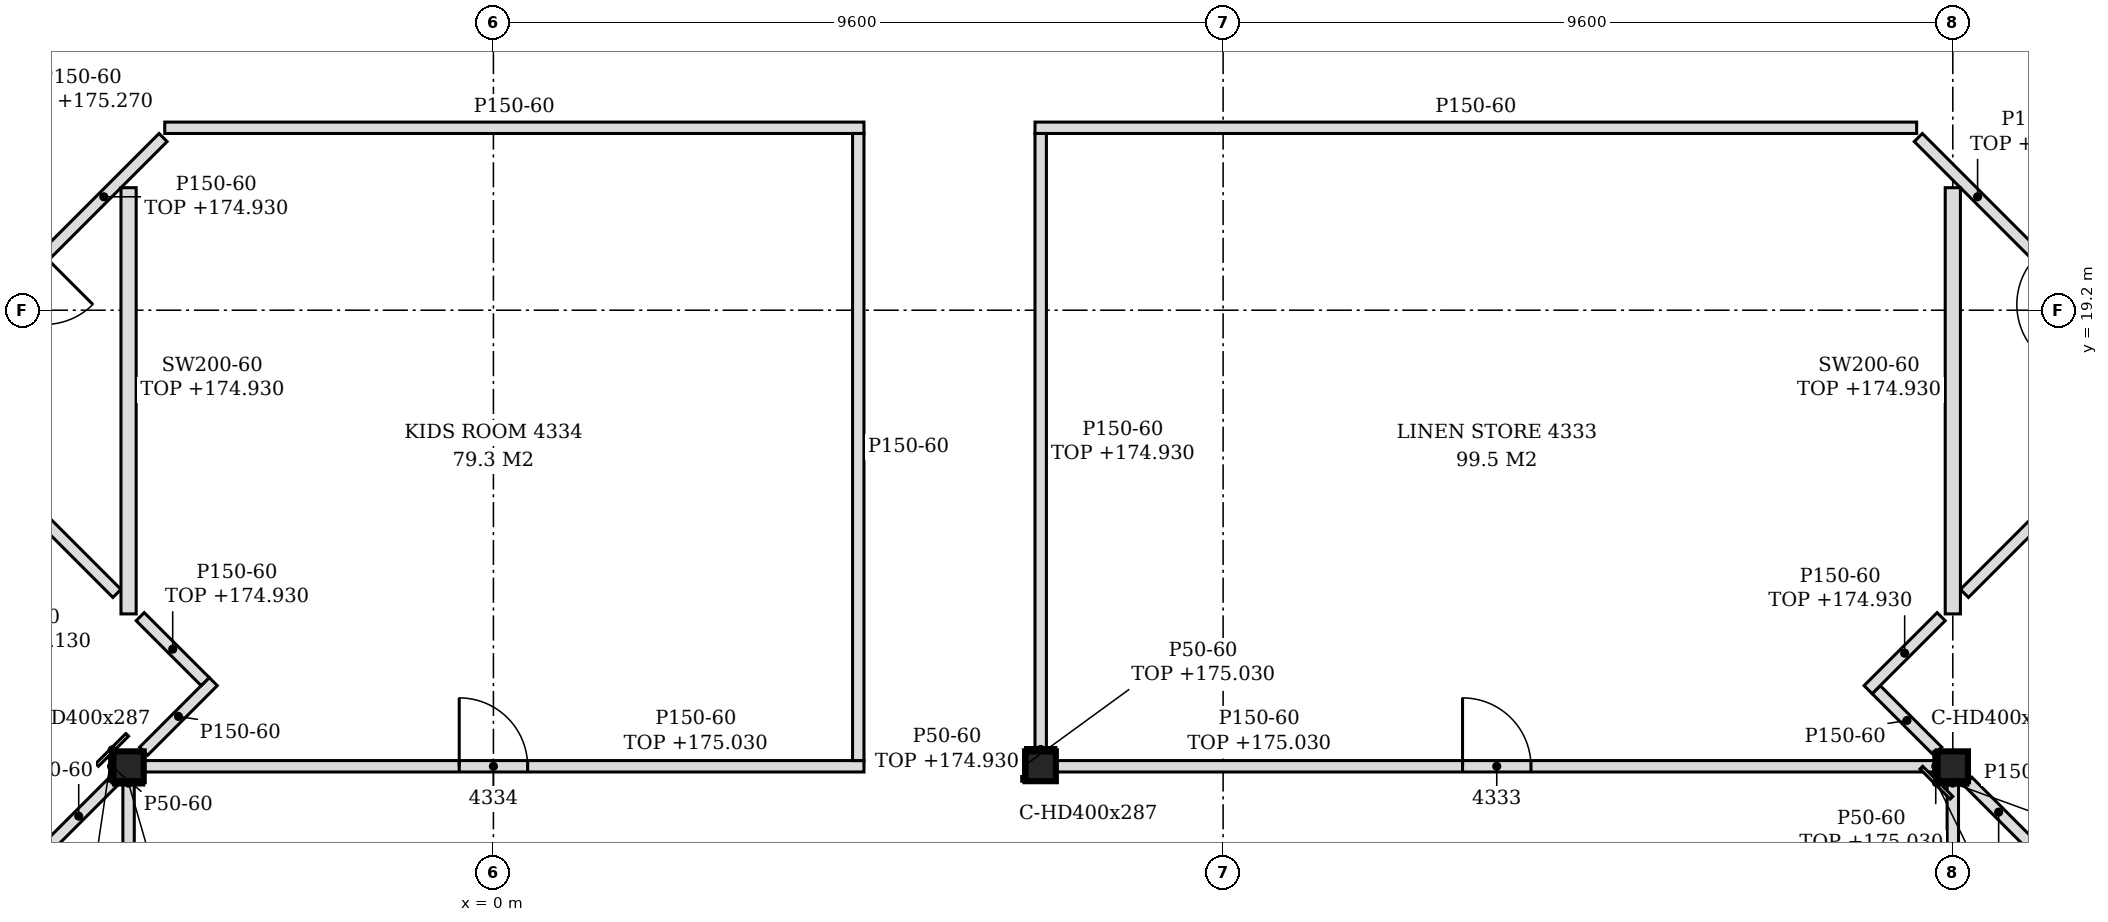
"""IFC4 building model, lengths in metres.
Left out: names, types, materials, properties, quantities, classifications, styles, units other than length and angle.
Written with IfcOpenShell. Run it as: python <this file> out.ifc"""

import sys

from ifc_helpers import new_model, si_unit, direction, frame, frame_2d, origin, origin_2d, place, context, subcontext, project, spatial, polyline, rectangle, i_section, outline, extrude, element, fill, save


model = new_model("IFC4")
c1 = context("Model", 3, precision=1e-05, world=origin(), true_north=direction((0.0, 1.0)))
c2 = subcontext(c1, "Body", "Model", "MODEL_VIEW")
j1 = project(units=[si_unit("LENGTHUNIT", "METRE"), si_unit("PLANEANGLEUNIT", "RADIAN")], contexts=[c1])
p1 = place(None, origin())
s1 = spatial("IfcSite", under=j1, at=p1, CompositionType="ELEMENT")
p2 = place(p1, origin())
s2 = spatial("IfcBuilding", under=s1, at=p2, CompositionType="ELEMENT")
p3 = place(p2, frame((0.0, 0.0, 172.2)))
s3 = spatial("IfcBuildingStorey", under=s2, at=p3, CompositionType="ELEMENT", Elevation=172.2)
for number, where, z_axis, x_axis in (
    (1, (-4.8, 13.2, -0.15), (0.0, 0.0, 1.0), (1.0, 0.0, 0.0)),
    (2, (7.2, 13.2, -0.15), (0.0, 0.0, 1.0), (1.0, 0.0, 0.0)),
    (3, (19.2, 13.2, -0.15), (0.0, 0.0, 1.0), (1.0, 0.0, 0.0)),
):
    element("IfcColumn", number, at=place(p3, frame(where, z_axis=z_axis, x_axis=x_axis)), inside=s3, PredefinedType="COLUMN", context=c2, shape_type="SweptSolid", body=[
        extrude(i_section(OverallWidth=0.399, OverallDepth=0.393, WebThickness=0.023, FlangeThickness=0.037, FilletRadius=0.015, at=origin_2d()), origin(), (0.0, 0.0, 1.0), 3.6),
    ])
p4 = place(p3, frame((-4.8, 2.596, 0.0), z_axis=(0.0, 0.0, 1.0), x_axis=(0.0, 1.0, 0.0)))
e4 = element("IfcWall", 4, at=p4, inside=s3, PredefinedType="PARTITIONING", context=c2, shape_type="SweptSolid", body=[
    extrude(rectangle(XDim=10.407, YDim=0.15, at=frame_2d((5.204, 0.0))), origin(), (0.0, 0.0, 1.0), 2.83),
])
p5 = place(p4, frame((4.303, 0.0, 0.0)))
e5 = element("IfcOpeningElement", 5, at=p5, cuts=e4, PredefinedType="OPENING", context=c2, shape_type="SweptSolid", body=[
    extrude(rectangle(XDim=0.9, YDim=2.1, at=frame_2d((0.45, 1.05))), frame((0.0, 0.085, 0.0), z_axis=(0.0, -1.0, 0.0), x_axis=(1.0, 0.0, 0.0)), (0.0, 0.0, 1.0), 0.17),
])
p6 = place(p3, frame((19.2, 2.596, 0.0), z_axis=(0.0, 0.0, 1.0), x_axis=(0.0, 1.0, 0.0)))
e6 = element("IfcWall", 6, at=p6, inside=s3, PredefinedType="PARTITIONING", context=c2, shape_type="SweptSolid", body=[
    extrude(rectangle(XDim=10.407, YDim=0.15, at=frame_2d((5.204, 0.0))), origin(), (0.0, 0.0, 1.0), 2.83),
])
p7 = place(p6, frame((2.954, 0.0, 0.0)))
e7 = element("IfcOpeningElement", 7, at=p7, cuts=e6, PredefinedType="OPENING", context=c2, shape_type="SweptSolid", body=[
    extrude(rectangle(XDim=0.9, YDim=2.1, at=frame_2d((0.45, 1.05))), frame((0.0, 0.085, 0.0), z_axis=(0.0, -1.0, 0.0), x_axis=(1.0, 0.0, 0.0)), (0.0, 0.0, 1.0), 0.17),
])
p8 = place(p3, frame((-5.914, 12.086, 0.0), z_axis=(0.0, 0.0, 1.0), x_axis=(0.707106781187, 0.707106781187, 0.0)))
e8 = element("IfcWall", 8, at=p8, inside=s3, PredefinedType="PARTITIONING", context=c2, shape_type="SweptSolid", body=[
    extrude(rectangle(XDim=1.295, YDim=0.15, at=frame_2d((0.648, 0.0))), origin(), (0.0, 0.0, 1.0), 3.45),
])
p9 = place(p3, frame((20.208, 12.086, 0.0), z_axis=(0.0, 0.0, 1.0), x_axis=(0.706747296365, 0.707466083343, 0.0)))
e9 = element("IfcWall", 9, at=p9, inside=s3, PredefinedType="PARTITIONING", context=c2, shape_type="SweptSolid", body=[
    extrude(rectangle(XDim=1.359, YDim=0.15, at=frame_2d((0.679, 0.0))), origin(), (0.0, 0.0, 1.0), 3.45),
])
p10 = place(p3, frame((20.208, 12.192, 0.0), z_axis=(0.0, 0.0, 1.0), x_axis=(-0.70721334539, 0.707000200921, 0.0)))
e10 = element("IfcWall", 10, at=p10, inside=s3, PredefinedType="PARTITIONING", context=c2, shape_type="SweptSolid", body=[
    extrude(rectangle(XDim=1.146, YDim=0.15, at=frame_2d((0.573, 0.0))), origin(), (0.0, 0.0, 1.0), 3.45),
])
p11 = place(p3, frame((-4.601, 13.2, 0.0), z_axis=(0.0, 0.0, 1.0), x_axis=(1.0, 0.0, 0.0)))
e11 = element("IfcWall", 11, at=p11, inside=s3, PredefinedType="PARTITIONING", context=c2, shape_type="SweptSolid", body=[
    extrude(rectangle(XDim=9.476, YDim=0.15, at=frame_2d((4.738, 0.0))), origin(), (0.0, 0.0, 1.0), 2.83),
])
p12 = place(p11, frame((4.151, 0.0, 0.0)))
e12 = element("IfcOpeningElement", 12, at=p12, cuts=e11, PredefinedType="OPENING", context=c2, shape_type="SweptSolid", body=[
    extrude(rectangle(XDim=0.9, YDim=2.1, at=frame_2d((0.45, 1.05))), frame((0.0, 0.085, 0.0), z_axis=(0.0, -1.0, 0.0), x_axis=(1.0, 0.0, 0.0)), (0.0, 0.0, 1.0), 0.17),
])
p13 = place(p3, frame((7.399, 13.2, 0.0), z_axis=(0.0, 0.0, 1.0), x_axis=(1.0, 0.0, 0.0)))
e13 = element("IfcWall", 13, at=p13, inside=s3, PredefinedType="PARTITIONING", context=c2, shape_type="SweptSolid", body=[
    extrude(rectangle(XDim=11.601, YDim=0.15, at=frame_2d((5.801, 0.0))), origin(), (0.0, 0.0, 1.0), 2.83),
])
p14 = place(p13, frame((5.351, 0.0, 0.0)))
e14 = element("IfcOpeningElement", 14, at=p14, cuts=e13, PredefinedType="OPENING", context=c2, shape_type="SweptSolid", body=[
    extrude(rectangle(XDim=0.9, YDim=2.1, at=frame_2d((0.45, 1.05))), frame((0.0, 0.085, 0.0), z_axis=(0.0, -1.0, 0.0), x_axis=(1.0, 0.0, 0.0)), (0.0, 0.0, 1.0), 0.17),
])
p15 = place(p3, frame((4.8, 13.275, 0.0), z_axis=(0.0, 0.0, 1.0), x_axis=(0.0, 1.0, 0.0)))
e15 = element("IfcWall", 15, at=p15, inside=s3, PredefinedType="PARTITIONING", context=c2, shape_type="SweptSolid", body=[
    extrude(outline(polyline([(0.0, 0.0), (8.25, 0.0), (8.25, 3.45), (5.88, 3.45), (5.878, 2.88), (5.67, 2.88), (5.668, 3.45), (0.075, 3.45), (0.073, 2.83), (0.0, 2.83), (0.0, 0.0)])), frame((0.0, 0.075, 0.0), z_axis=(0.0, -1.0, 0.0), x_axis=(1.0, 0.0, 0.0)), (0.0, 0.0, 1.0), 0.15),
])
p16 = place(p3, frame((-4.602, 13.398, 0.0), z_axis=(0.0, 0.0, 1.0), x_axis=(0.707106781187, 0.707106781187, 0.0)))
e16 = element("IfcWall", 16, at=p16, inside=s3, PredefinedType="PARTITIONING", context=c2, shape_type="SweptSolid", body=[
    extrude(rectangle(XDim=1.296, YDim=0.15, at=frame_2d((0.648, 0.0))), origin(), (0.0, 0.0, 1.0), 3.45),
])
p17 = place(p3, frame((7.2, 13.396, 0.0), z_axis=(0.0, 0.0, 1.0), x_axis=(0.0, 1.0, 0.0)))
e17 = element("IfcWall", 17, at=p17, inside=s3, PredefinedType="PARTITIONING", context=c2, shape_type="SweptSolid", body=[
    extrude(rectangle(XDim=8.128, YDim=0.15, at=frame_2d((4.064, 0.0))), origin(), (0.0, 0.0, 1.0), 2.73),
])
p18 = place(p3, frame((19.002, 13.398, 0.0), z_axis=(0.0, 0.0, 1.0), x_axis=(-0.707000200921, 0.70721334539, 0.0)))
e18 = element("IfcWall", 18, at=p18, inside=s3, PredefinedType="PARTITIONING", context=c2, shape_type="SweptSolid", body=[
    extrude(rectangle(XDim=1.146, YDim=0.15, at=frame_2d((0.573, 0.0))), origin(), (0.0, 0.0, 1.0), 3.45),
])
p19 = place(p3, frame((18.086, 14.208, 0.0), z_axis=(0.0, 0.0, 1.0), x_axis=(0.707466083343, 0.706747296365, 0.0)))
e19 = element("IfcWall", 19, at=p19, inside=s3, PredefinedType="PARTITIONING", context=c2, shape_type="SweptSolid", body=[
    extrude(rectangle(XDim=1.359, YDim=0.15, at=frame_2d((0.679, 0.0))), origin(), (0.0, 0.0, 1.0), 2.73),
])
p20 = place(p3, frame((-3.792, 14.314, 0.0), z_axis=(0.0, 0.0, 1.0), x_axis=(-0.707409718716, 0.706803713817, 0.0)))
e20 = element("IfcWall", 20, at=p20, inside=s3, PredefinedType="PARTITIONING", context=c2, shape_type="SweptSolid", body=[
    extrude(rectangle(XDim=1.208, YDim=0.15, at=frame_2d((0.604, 0.0))), origin(), (0.0, 0.0, 1.0), 2.73),
])
for number, where, z_axis, x_axis in (
    (21, (-4.8, 15.205, 0.0), (0.0, 0.0, 1.0), (0.0, 1.0, 0.0)),
    (22, (19.2, 15.205, 0.0), (0.0, 0.0, 1.0), (0.0, 1.0, 0.0)),
):
    element("IfcWall", number, at=place(p3, frame(where, z_axis=z_axis, x_axis=x_axis)), inside=s3, PredefinedType="PARTITIONING", context=c2, shape_type="SweptSolid", body=[
        extrude(rectangle(XDim=5.607, YDim=0.2, at=frame_2d((2.804, 0.0))), origin(), (0.0, 0.0, 1.0), 2.73),
    ])
p21 = place(p3, frame((-4.953, 15.474, 0.0), z_axis=(0.0, 0.0, 1.0), x_axis=(-0.707008778354, 0.707204770438, 0.0)))
e23 = element("IfcWall", 23, at=p21, inside=s3, PredefinedType="PARTITIONING", context=c2, shape_type="SweptSolid", body=[
    extrude(rectangle(XDim=3.737, YDim=0.15, at=frame_2d((1.869, 0.0))), origin(), (0.0, 0.0, 1.0), 2.73),
])
p22 = place(p3, frame((19.353, 15.474, 0.0), z_axis=(0.0, 0.0, 1.0), x_axis=(0.707012556818, 0.707200993001, 0.0)))
e24 = element("IfcWall", 24, at=p22, inside=s3, PredefinedType="PARTITIONING", context=c2, shape_type="SweptSolid", body=[
    extrude(rectangle(XDim=3.887, YDim=0.15, at=frame_2d((1.943, 0.0))), origin(), (0.0, 0.0, 1.0), 2.73),
])
p23 = place(p3, frame((-7.701, 18.117, 0.0), z_axis=(0.0, 0.0, 1.0), x_axis=(0.707106781187, 0.707106781187, 0.0)))
e25 = element("IfcWall", 25, at=p23, inside=s3, PredefinedType="PARTITIONING", context=c2, shape_type="SweptSolid", body=[
    extrude(rectangle(XDim=4.745, YDim=0.15, at=frame_2d((2.372, 0.0))), origin(), (0.0, 0.0, 1.0), 2.73),
])
p24 = place(p23, frame((1.639, 0.0, 0.0)))
e26 = element("IfcOpeningElement", 26, at=p24, cuts=e25, PredefinedType="OPENING", context=c2, shape_type="SweptSolid", body=[
    extrude(rectangle(XDim=0.9, YDim=2.1, at=frame_2d((0.45, 1.05))), frame((0.0, 0.085, 0.0), z_axis=(0.0, -1.0, 0.0), x_axis=(1.0, 0.0, 0.0)), (0.0, 0.0, 1.0), 0.17),
])
p25 = place(p3, frame((21.995, 18.223, 0.0), z_axis=(0.0, 0.0, 1.0), x_axis=(-0.707106781187, 0.707106781187, 0.0)))
e27 = element("IfcWall", 27, at=p25, inside=s3, PredefinedType="PARTITIONING", context=c2, shape_type="SweptSolid", body=[
    extrude(rectangle(XDim=4.595, YDim=0.15, at=frame_2d((2.297, 0.0))), origin(), (0.0, 0.0, 1.0), 2.73),
])
p26 = place(p25, frame((1.489, 0.0, 0.0)))
e28 = element("IfcOpeningElement", 28, at=p26, cuts=e27, PredefinedType="OPENING", context=c2, shape_type="SweptSolid", body=[
    extrude(rectangle(XDim=0.9, YDim=2.1, at=frame_2d((0.45, 1.05))), frame((0.0, 0.085, 0.0), z_axis=(0.0, -1.0, 0.0), x_axis=(1.0, 0.0, 0.0)), (0.0, 0.0, 1.0), 0.17),
])
p27 = place(p3, frame((23.117, 20.495, 0.0), z_axis=(0.0, 0.0, 1.0), x_axis=(-0.707081222956, 0.707132338493, 0.0)))
e29 = element("IfcWall", 29, at=p27, inside=s3, PredefinedType="PARTITIONING", context=c2, shape_type="SweptSolid", body=[
    extrude(rectangle(XDim=4.776, YDim=0.15, at=frame_2d((2.388, 0.0))), origin(), (0.0, 0.0, 1.0), 2.98),
])
p28 = place(p3, frame((-8.604, 20.608, 0.0), z_axis=(0.0, 0.0, 1.0), x_axis=(0.707080337897, 0.707133223487, 0.0)))
e30 = element("IfcWall", 30, at=p28, inside=s3, PredefinedType="PARTITIONING", context=c2, shape_type="SweptSolid", body=[
    extrude(rectangle(XDim=4.616, YDim=0.15, at=frame_2d((2.308, 0.0))), origin(), (0.0, 0.0, 1.0), 3.07),
])
p29 = place(p28, frame((1.085, 0.0, 0.0)))
e31 = element("IfcOpeningElement", 31, at=p29, cuts=e30, PredefinedType="OPENING", context=c2, shape_type="SweptSolid", body=[
    extrude(rectangle(XDim=0.9, YDim=2.1, at=frame_2d((0.45, 1.05))), frame((0.0, 0.085, 0.0), z_axis=(0.0, -1.0, 0.0), x_axis=(1.0, 0.0, 0.0)), (0.0, 0.0, 1.0), 0.17),
])
p30 = place(p3, frame((-4.324, 21.6, 0.0), z_axis=(0.0, 0.0, 1.0), x_axis=(1.0, 0.0, 0.0)))
e32 = element("IfcWall", 32, at=p30, inside=s3, PredefinedType="PARTITIONING", context=c2, shape_type="SweptSolid", body=[
    extrude(rectangle(XDim=9.199, YDim=0.15, at=frame_2d((4.6, 0.0))), origin(), (0.0, 0.0, 1.0), 3.45),
])
p31 = place(p3, frame((7.125, 21.6, 0.0), z_axis=(0.0, 0.0, 1.0), x_axis=(1.0, 0.0, 0.0)))
e33 = element("IfcWall", 33, at=p31, inside=s3, PredefinedType="PARTITIONING", context=c2, shape_type="SweptSolid", body=[
    extrude(outline(polyline([(0.0, 0.0), (11.599, 0.0), (11.599, 3.45), (0.225, 3.45), (0.223, 2.73), (0.0, 2.73), (0.0, 0.0)])), frame((0.0, 0.075, 0.0), z_axis=(0.0, -1.0, 0.0), x_axis=(1.0, 0.0, 0.0)), (0.0, 0.0, 1.0), 0.15),
])
p32 = place(p3, frame((-5.024, 13.003, 0.0), z_axis=(0.0, 0.0, 1.0), x_axis=(0.0, 1.0, 0.0)))
e34 = element("IfcWall", 34, at=p32, inside=s3, PredefinedType="PARTITIONING", context=c2, shape_type="SweptSolid", body=[
    extrude(rectangle(XDim=0.393, YDim=0.05, at=frame_2d((0.197, 0.0))), origin(), (0.0, 0.0, 1.0), 3.45),
])
p33 = place(p3, frame((18.976, 13.003, 0.0), z_axis=(0.0, 0.0, 1.0), x_axis=(0.0, 1.0, 0.0)))
e35 = element("IfcWall", 35, at=p33, inside=s3, PredefinedType="PARTITIONING", context=c2, shape_type="SweptSolid", body=[
    extrude(rectangle(XDim=0.393, YDim=0.05, at=frame_2d((0.197, 0.0))), origin(), (0.0, 0.0, 1.0), 2.83),
])
p34 = place(p3, frame((-5.214, 13.218, 0.0), z_axis=(0.0, 0.0, 1.0), x_axis=(0.707106781187, 0.707106781187, 0.0)))
e36 = element("IfcWall", 36, at=p34, inside=s3, PredefinedType="PARTITIONING", context=c2, shape_type="SweptSolid", body=[
    extrude(rectangle(XDim=0.56, YDim=0.05, at=frame_2d((0.28, 0.0))), origin(), (0.0, 0.0, 1.0), 2.73),
])
p35 = place(p3, frame((19.182, 12.786, 0.0), z_axis=(0.0, 0.0, 1.0), x_axis=(-0.707106781187, 0.707106781187, 0.0)))
e37 = element("IfcWall", 37, at=p35, inside=s3, PredefinedType="PARTITIONING", context=c2, shape_type="SweptSolid", body=[
    extrude(rectangle(XDim=0.56, YDim=0.05, at=frame_2d((0.28, 0.0))), origin(), (0.0, 0.0, 1.0), 2.83),
])
p36 = place(p3, frame((-5.0, 12.979, 0.0), z_axis=(0.0, 0.0, 1.0), x_axis=(1.0, 0.0, 0.0)))
e38 = element("IfcWall", 38, at=p36, inside=s3, PredefinedType="PARTITIONING", context=c2, shape_type="SweptSolid", body=[
    extrude(rectangle(XDim=0.399, YDim=0.05, at=frame_2d((0.199, 0.0))), origin(), (0.0, 0.0, 1.0), 2.83),
])
p37 = place(p3, frame((7.0, 13.421, 0.0), z_axis=(0.0, 0.0, 1.0), x_axis=(1.0, 0.0, 0.0)))
e39 = element("IfcWall", 39, at=p37, inside=s3, PredefinedType="PARTITIONING", context=c2, shape_type="SweptSolid", body=[
    extrude(rectangle(XDim=0.399, YDim=0.05, at=frame_2d((0.199, 0.0))), origin(), (0.0, 0.0, 1.0), 2.73),
])
p38 = place(p3, frame((19.0, 12.979, 0.0), z_axis=(0.0, 0.0, 1.0), x_axis=(1.0, 0.0, 0.0)))
e40 = element("IfcWall", 40, at=p38, inside=s3, PredefinedType="PARTITIONING", context=c2, shape_type="SweptSolid", body=[
    extrude(rectangle(XDim=0.399, YDim=0.05, at=frame_2d((0.199, 0.0))), origin(), (0.0, 0.0, 1.0), 2.83),
])
p39 = place(p3, frame((6.976, 13.003, 0.0), z_axis=(0.0, 0.0, 1.0), x_axis=(0.0, 1.0, 0.0)))
e41 = element("IfcWall", 41, at=p39, inside=s3, PredefinedType="PARTITIONING", context=c2, shape_type="SweptSolid", body=[
    extrude(rectangle(XDim=0.393, YDim=0.05, at=frame_2d((0.197, 0.0))), origin(), (0.0, 0.0, 1.0), 2.83),
])
p40 = place(p14, origin())
e42 = element("IfcDoor", 42, at=p40, inside=s3, OperationType="SINGLE_SWING_LEFT", PredefinedType="DOOR", context=c2, shape_type="SweptSolid", body=[
    extrude(rectangle(XDim=0.9, YDim=2.1, at=frame_2d((0.45, 1.05))), frame((0.0, 0.025, 0.0), z_axis=(0.0, -1.0, 0.0), x_axis=(1.0, 0.0, 0.0)), (0.0, 0.0, 1.0), 0.05),
])
fill(e14, e42)
p41 = place(p12, origin())
e43 = element("IfcDoor", 43, at=p41, inside=s3, OperationType="SINGLE_SWING_LEFT", PredefinedType="DOOR", context=c2, shape_type="SweptSolid", body=[
    extrude(rectangle(XDim=0.9, YDim=2.1, at=frame_2d((0.45, 1.05))), frame((0.0, 0.025, 0.0), z_axis=(0.0, -1.0, 0.0), x_axis=(1.0, 0.0, 0.0)), (0.0, 0.0, 1.0), 0.05),
])
fill(e12, e43)
save(model, sys.argv[1])
